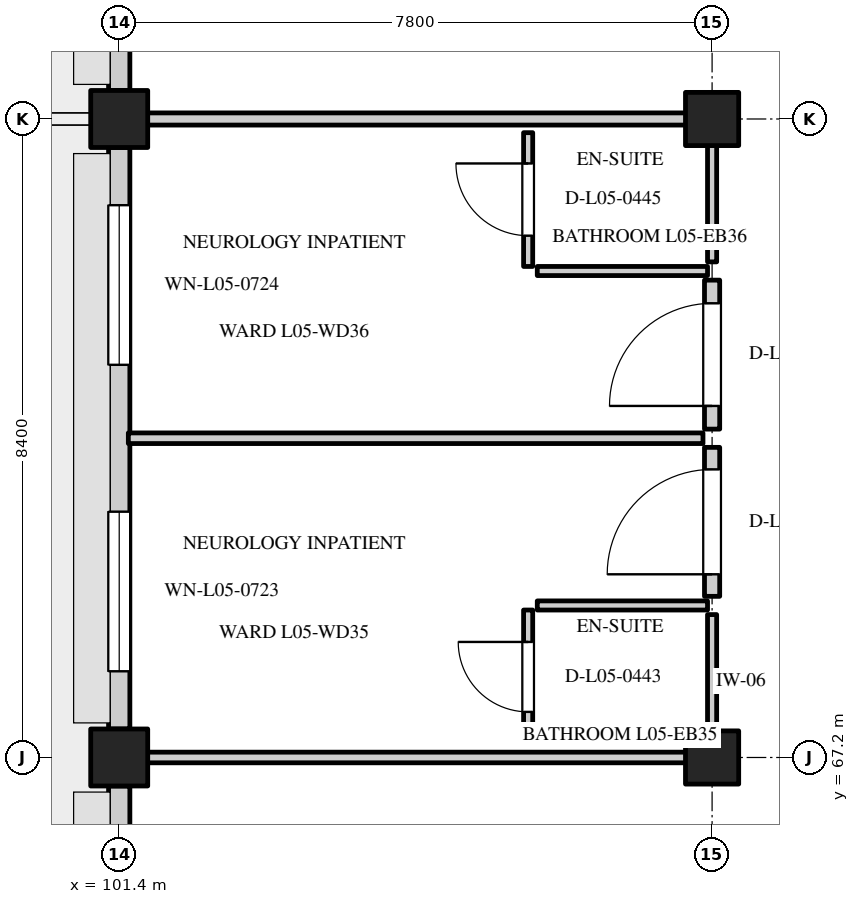
"""IFC4 building model, lengths in metres.
Left out: names, types, materials, properties, quantities, classifications, styles, units other than length and angle.
Written with IfcOpenShell. Run it as: python <this file> out.ifc"""

import sys

from ifc_helpers import new_model, si_unit, direction, frame, frame_2d, origin, origin_2d, place, context, subcontext, project, spatial, rectangle, extrude, element, fill, save


model = new_model("IFC4")
c1 = context("Model", 3, precision=1e-05, world=origin(), true_north=direction((0.0, 1.0)))
c2 = subcontext(c1, "Body", "Model", "MODEL_VIEW")
j1 = project(units=[si_unit("LENGTHUNIT", "METRE"), si_unit("PLANEANGLEUNIT", "RADIAN")], contexts=[c1])
p1 = place(None, origin())
s1 = spatial("IfcSite", under=j1, at=p1, CompositionType="ELEMENT")
p2 = place(p1, origin())
s2 = spatial("IfcBuilding", under=s1, at=p2, CompositionType="ELEMENT")
p3 = place(p2, frame((0.0, 0.0, 22.2)))
s3 = spatial("IfcBuildingStorey", under=s2, at=p3, CompositionType="ELEMENT", Elevation=22.2)
for number, where, z_axis, x_axis in (
    (1, (101.4, 67.2, 0.0), (0.0, 0.0, 1.0), (1.0, 0.0, 0.0)),
    (2, (101.4, 75.6, 0.0), (0.0, 0.0, 1.0), (1.0, 0.0, 0.0)),
):
    element("IfcColumn", number, at=place(p3, frame(where, z_axis=z_axis, x_axis=x_axis)), inside=s3, PredefinedType="COLUMN", context=c2, shape_type="SweptSolid", body=[
        extrude(rectangle(XDim=0.75, YDim=0.75, at=origin_2d()), origin(), (0.0, 0.0, 1.0), 3.9),
    ])
for number, where, z_axis, x_axis in (
    (3, (109.2, 67.2, 0.0), (0.0, 0.0, 1.0), (1.0, 0.0, 0.0)),
    (4, (109.2, 75.6, 0.0), (0.0, 0.0, 1.0), (1.0, 0.0, 0.0)),
):
    element("IfcColumn", number, at=place(p3, frame(where, z_axis=z_axis, x_axis=x_axis)), inside=s3, PredefinedType="COLUMN", context=c2, shape_type="SweptSolid", body=[
        extrude(rectangle(XDim=0.7, YDim=0.7, at=origin_2d()), origin(), (0.0, 0.0, 1.0), 3.9),
    ])
p4 = place(p3, frame((101.4, 59.175, 0.0), z_axis=(0.0, 0.0, 1.0), x_axis=(0.0, 1.0, 0.0)))
e5 = element("IfcWall", 5, at=p4, inside=s3, PredefinedType="STANDARD", context=c2, shape_type="SweptSolid", body=[
    extrude(rectangle(XDim=7.65, YDim=0.28, at=frame_2d((3.825, 0.0))), origin(), (0.0, 0.0, 1.0), 2.95),
])
p5 = place(p4, frame((0.759, 0.0, 0.8)))
e6 = element("IfcOpeningElement", 6, at=p5, cuts=e5, PredefinedType="OPENING", context=c2, shape_type="SweptSolid", body=[
    extrude(rectangle(XDim=2.1, YDim=1.55, at=frame_2d((1.05, 0.775))), frame((0.0, 0.152, 0.0), z_axis=(0.0, -1.0, 0.0), x_axis=(1.0, 0.0, 0.0)), (0.0, 0.0, 1.0), 0.304),
])
p6 = place(p4, frame((4.791, 0.0, 0.8)))
e7 = element("IfcOpeningElement", 7, at=p6, cuts=e5, PredefinedType="OPENING", context=c2, shape_type="SweptSolid", body=[
    extrude(rectangle(XDim=2.1, YDim=1.55, at=frame_2d((1.05, 0.775))), frame((0.0, 0.152, 0.0), z_axis=(0.0, -1.0, 0.0), x_axis=(1.0, 0.0, 0.0)), (0.0, 0.0, 1.0), 0.304),
])
p7 = place(p3, frame((101.4, 67.575, 0.0), z_axis=(0.0, 0.0, 1.0), x_axis=(0.0, 1.0, 0.0)))
e8 = element("IfcWall", 8, at=p7, inside=s3, PredefinedType="STANDARD", context=c2, shape_type="SweptSolid", body=[
    extrude(rectangle(XDim=7.65, YDim=0.28, at=frame_2d((3.825, 0.0))), origin(), (0.0, 0.0, 1.0), 2.95),
])
p8 = place(p7, frame((0.759, 0.0, 0.8)))
e9 = element("IfcOpeningElement", 9, at=p8, cuts=e8, PredefinedType="OPENING", context=c2, shape_type="SweptSolid", body=[
    extrude(rectangle(XDim=2.1, YDim=1.45, at=frame_2d((1.05, 0.725))), frame((0.0, 0.152, 0.0), z_axis=(0.0, -1.0, 0.0), x_axis=(1.0, 0.0, 0.0)), (0.0, 0.0, 1.0), 0.304),
])
p9 = place(p7, frame((4.791, 0.0, 0.8)))
e10 = element("IfcOpeningElement", 10, at=p9, cuts=e8, PredefinedType="OPENING", context=c2, shape_type="SweptSolid", body=[
    extrude(rectangle(XDim=2.1, YDim=1.45, at=frame_2d((1.05, 0.725))), frame((0.0, 0.152, 0.0), z_axis=(0.0, -1.0, 0.0), x_axis=(1.0, 0.0, 0.0)), (0.0, 0.0, 1.0), 0.304),
])
p10 = place(p3, frame((101.4, 75.975, 0.0), z_axis=(0.0, 0.0, 1.0), x_axis=(0.0, 1.0, 0.0)))
e11 = element("IfcWall", 11, at=p10, inside=s3, PredefinedType="STANDARD", context=c2, shape_type="SweptSolid", body=[
    extrude(rectangle(XDim=7.65, YDim=0.28, at=frame_2d((3.825, 0.0))), origin(), (0.0, 0.0, 1.0), 2.95),
])
p11 = place(p10, frame((0.809, 0.0, 0.8)))
e12 = element("IfcOpeningElement", 12, at=p11, cuts=e11, PredefinedType="OPENING", context=c2, shape_type="SweptSolid", body=[
    extrude(rectangle(XDim=2.0, YDim=1.75, at=frame_2d((1.0, 0.875))), frame((0.0, 0.152, 0.0), z_axis=(0.0, -1.0, 0.0), x_axis=(1.0, 0.0, 0.0)), (0.0, 0.0, 1.0), 0.304),
])
p12 = place(p10, frame((4.841, 0.0, 0.8)))
e13 = element("IfcOpeningElement", 13, at=p12, cuts=e11, PredefinedType="OPENING", context=c2, shape_type="SweptSolid", body=[
    extrude(rectangle(XDim=2.0, YDim=1.75, at=frame_2d((1.0, 0.875))), frame((0.0, 0.152, 0.0), z_axis=(0.0, -1.0, 0.0), x_axis=(1.0, 0.0, 0.0)), (0.0, 0.0, 1.0), 0.304),
])
for number, where, z_axis, x_axis in (
    (14, (101.52, 67.2, 0.0), (0.0, 0.0, 1.0), (1.0, 0.0, 0.0)),
    (15, (101.52, 71.4, 0.0), (0.0, 0.0, 1.0), (1.0, 0.0, 0.0)),
):
    element("IfcWall", number, at=place(p3, frame(where, z_axis=z_axis, x_axis=x_axis)), inside=s3, PredefinedType="PARTITIONING", context=c2, shape_type="SweptSolid", body=[
        extrude(rectangle(XDim=7.56, YDim=0.14, at=frame_2d((3.78, 0.0))), origin(), (0.0, 0.0, 1.0), 3.58),
    ])
p13 = place(p3, frame((109.2, 69.32, 0.0), z_axis=(0.0, 0.0, 1.0), x_axis=(0.0, 1.0, 0.0)))
e16 = element("IfcWall", 16, at=p13, inside=s3, PredefinedType="STANDARD", context=c2, shape_type="SweptSolid", body=[
    extrude(rectangle(XDim=1.96, YDim=0.2, at=frame_2d((0.98, 0.0))), origin(), (0.0, 0.0, 1.0), 3.58),
])
p14 = place(p13, frame((0.29, 0.0, 0.0)))
e17 = element("IfcOpeningElement", 17, at=p14, cuts=e16, PredefinedType="OPENING", context=c2, shape_type="SweptSolid", body=[
    extrude(rectangle(XDim=1.38, YDim=2.2, at=frame_2d((0.69, 1.1))), frame((0.0, 0.112, 0.0), z_axis=(0.0, -1.0, 0.0), x_axis=(1.0, 0.0, 0.0)), (0.0, 0.0, 1.0), 0.224),
])
p15 = place(p3, frame((109.2, 67.32, 0.0), z_axis=(0.0, 0.0, 1.0), x_axis=(0.0, 1.0, 0.0)))
e18 = element("IfcWall", 18, at=p15, inside=s3, PredefinedType="PARTITIONING", context=c2, shape_type="SweptSolid", body=[
    extrude(rectangle(XDim=1.76, YDim=0.12, at=frame_2d((0.88, 0.0))), origin(), (0.0, 0.0, 1.0), 3.58),
])
p16 = place(p3, frame((106.9, 69.2, 0.0), z_axis=(0.0, 0.0, 1.0), x_axis=(1.0, 0.0, 0.0)))
e19 = element("IfcWall", 19, at=p16, inside=s3, PredefinedType="PARTITIONING", context=c2, shape_type="SweptSolid", body=[
    extrude(rectangle(XDim=2.24, YDim=0.12, at=frame_2d((1.12, 0.0))), origin(), (0.0, 0.0, 1.0), 3.58),
])
p17 = place(p3, frame((106.78, 67.38, 0.0), z_axis=(0.0, 0.0, 1.0), x_axis=(0.0, 1.0, 0.0)))
e20 = element("IfcWall", 20, at=p17, inside=s3, PredefinedType="PARTITIONING", context=c2, shape_type="SweptSolid", body=[
    extrude(rectangle(XDim=1.76, YDim=0.12, at=frame_2d((0.88, 0.0))), origin(), (0.0, 0.0, 1.0), 3.58),
])
p18 = place(p17, frame((0.42, 0.0, 0.0)))
e21 = element("IfcOpeningElement", 21, at=p18, cuts=e20, PredefinedType="OPENING", context=c2, shape_type="SweptSolid", body=[
    extrude(rectangle(XDim=0.92, YDim=2.08, at=frame_2d((0.46, 1.04))), frame((0.0, 0.072, 0.0), z_axis=(0.0, -1.0, 0.0), x_axis=(1.0, 0.0, 0.0)), (0.0, 0.0, 1.0), 0.144),
])
p19 = place(p3, frame((101.52, 75.6, 0.0), z_axis=(0.0, 0.0, 1.0), x_axis=(1.0, 0.0, 0.0)))
e22 = element("IfcWall", 22, at=p19, inside=s3, PredefinedType="PARTITIONING", context=c2, shape_type="SweptSolid", body=[
    extrude(rectangle(XDim=7.56, YDim=0.16, at=frame_2d((3.78, 0.0))), origin(), (0.0, 0.0, 1.0), 2.95),
])
p20 = place(p3, frame((109.2, 71.52, 0.0), z_axis=(0.0, 0.0, 1.0), x_axis=(0.0, 1.0, 0.0)))
e23 = element("IfcWall", 23, at=p20, inside=s3, PredefinedType="STANDARD", context=c2, shape_type="SweptSolid", body=[
    extrude(rectangle(XDim=1.96, YDim=0.2, at=frame_2d((0.98, 0.0))), origin(), (0.0, 0.0, 1.0), 3.58),
])
p21 = place(p20, frame((0.305, 0.0, 0.0)))
e24 = element("IfcOpeningElement", 24, at=p21, cuts=e23, PredefinedType="OPENING", context=c2, shape_type="SweptSolid", body=[
    extrude(rectangle(XDim=1.35, YDim=2.15, at=frame_2d((0.675, 1.075))), frame((0.0, 0.112, 0.0), z_axis=(0.0, -1.0, 0.0), x_axis=(1.0, 0.0, 0.0)), (0.0, 0.0, 1.0), 0.224),
])
p22 = place(p3, frame((109.2, 73.72, 0.0), z_axis=(0.0, 0.0, 1.0), x_axis=(0.0, 1.0, 0.0)))
e25 = element("IfcWall", 25, at=p22, inside=s3, PredefinedType="PARTITIONING", context=c2, shape_type="SweptSolid", body=[
    extrude(rectangle(XDim=1.76, YDim=0.12, at=frame_2d((0.88, 0.0))), origin(), (0.0, 0.0, 1.0), 3.58),
])
p23 = place(p3, frame((106.9, 73.6, 0.0), z_axis=(0.0, 0.0, 1.0), x_axis=(1.0, 0.0, 0.0)))
e26 = element("IfcWall", 26, at=p23, inside=s3, PredefinedType="PARTITIONING", context=c2, shape_type="SweptSolid", body=[
    extrude(rectangle(XDim=2.24, YDim=0.12, at=frame_2d((1.12, 0.0))), origin(), (0.0, 0.0, 1.0), 3.58),
])
p24 = place(p3, frame((106.78, 73.66, 0.0), z_axis=(0.0, 0.0, 1.0), x_axis=(0.0, 1.0, 0.0)))
e27 = element("IfcWall", 27, at=p24, inside=s3, PredefinedType="PARTITIONING", context=c2, shape_type="SweptSolid", body=[
    extrude(rectangle(XDim=1.76, YDim=0.12, at=frame_2d((0.88, 0.0))), origin(), (0.0, 0.0, 1.0), 3.58),
])
p25 = place(p24, frame((0.405, 0.0, 0.0)))
e28 = element("IfcOpeningElement", 28, at=p25, cuts=e27, PredefinedType="OPENING", context=c2, shape_type="SweptSolid", body=[
    extrude(rectangle(XDim=0.95, YDim=2.1, at=frame_2d((0.475, 1.05))), frame((0.0, 0.072, 0.0), z_axis=(0.0, -1.0, 0.0), x_axis=(1.0, 0.0, 0.0)), (0.0, 0.0, 1.0), 0.144),
])
p26 = place(p8, origin())
e29 = element("IfcWindow", 29, at=p26, inside=s3, PartitioningType="DOUBLE_PANEL_VERTICAL", PredefinedType="WINDOW", context=c2, shape_type="SweptSolid", body=[
    extrude(rectangle(XDim=2.1, YDim=1.45, at=frame_2d((1.05, 0.725))), frame((0.0, 0.03, 0.0), z_axis=(0.0, -1.0, 0.0), x_axis=(1.0, 0.0, 0.0)), (0.0, 0.0, 1.0), 0.06),
])
fill(e9, e29)
p27 = place(p9, origin())
e30 = element("IfcWindow", 30, at=p27, inside=s3, PartitioningType="DOUBLE_PANEL_VERTICAL", PredefinedType="WINDOW", context=c2, shape_type="SweptSolid", body=[
    extrude(rectangle(XDim=2.1, YDim=1.45, at=frame_2d((1.05, 0.725))), frame((0.0, 0.03, 0.0), z_axis=(0.0, -1.0, 0.0), x_axis=(1.0, 0.0, 0.0)), (0.0, 0.0, 1.0), 0.06),
])
fill(e10, e30)
p28 = place(p14, origin())
e31 = element("IfcDoor", 31, at=p28, inside=s3, OperationType="SINGLE_SWING_LEFT", PredefinedType="DOOR", context=c2, shape_type="SweptSolid", body=[
    extrude(rectangle(XDim=1.38, YDim=2.2, at=frame_2d((0.69, 1.1))), frame((0.0, 0.025, 0.0), z_axis=(0.0, -1.0, 0.0), x_axis=(1.0, 0.0, 0.0)), (0.0, 0.0, 1.0), 0.05),
])
fill(e17, e31)
p29 = place(p18, frame((0.92, 0.0, 0.0), z_axis=(0.0, 0.0, 1.0), x_axis=(-1.0, 0.0, 0.0)))
e32 = element("IfcDoor", 32, at=p29, inside=s3, OperationType="SINGLE_SWING_LEFT", PredefinedType="DOOR", context=c2, shape_type="SweptSolid", body=[
    extrude(rectangle(XDim=0.92, YDim=2.08, at=frame_2d((0.46, 1.04))), frame((0.0, 0.025, 0.0), z_axis=(0.0, -1.0, 0.0), x_axis=(1.0, 0.0, 0.0)), (0.0, 0.0, 1.0), 0.05),
])
fill(e21, e32)
p30 = place(p21, origin())
e33 = element("IfcDoor", 33, at=p30, inside=s3, OperationType="SINGLE_SWING_LEFT", PredefinedType="DOOR", context=c2, shape_type="SweptSolid", body=[
    extrude(rectangle(XDim=1.35, YDim=2.15, at=frame_2d((0.675, 1.075))), frame((0.0, 0.025, 0.0), z_axis=(0.0, -1.0, 0.0), x_axis=(1.0, 0.0, 0.0)), (0.0, 0.0, 1.0), 0.05),
])
fill(e24, e33)
p31 = place(p25, frame((0.95, 0.0, 0.0), z_axis=(0.0, 0.0, 1.0), x_axis=(-1.0, 0.0, 0.0)))
e34 = element("IfcDoor", 34, at=p31, inside=s3, OperationType="SINGLE_SWING_LEFT", PredefinedType="DOOR", context=c2, shape_type="SweptSolid", body=[
    extrude(rectangle(XDim=0.95, YDim=2.1, at=frame_2d((0.475, 1.05))), frame((0.0, 0.025, 0.0), z_axis=(0.0, -1.0, 0.0), x_axis=(1.0, 0.0, 0.0)), (0.0, 0.0, 1.0), 0.05),
])
fill(e28, e34)
save(model, sys.argv[1])
